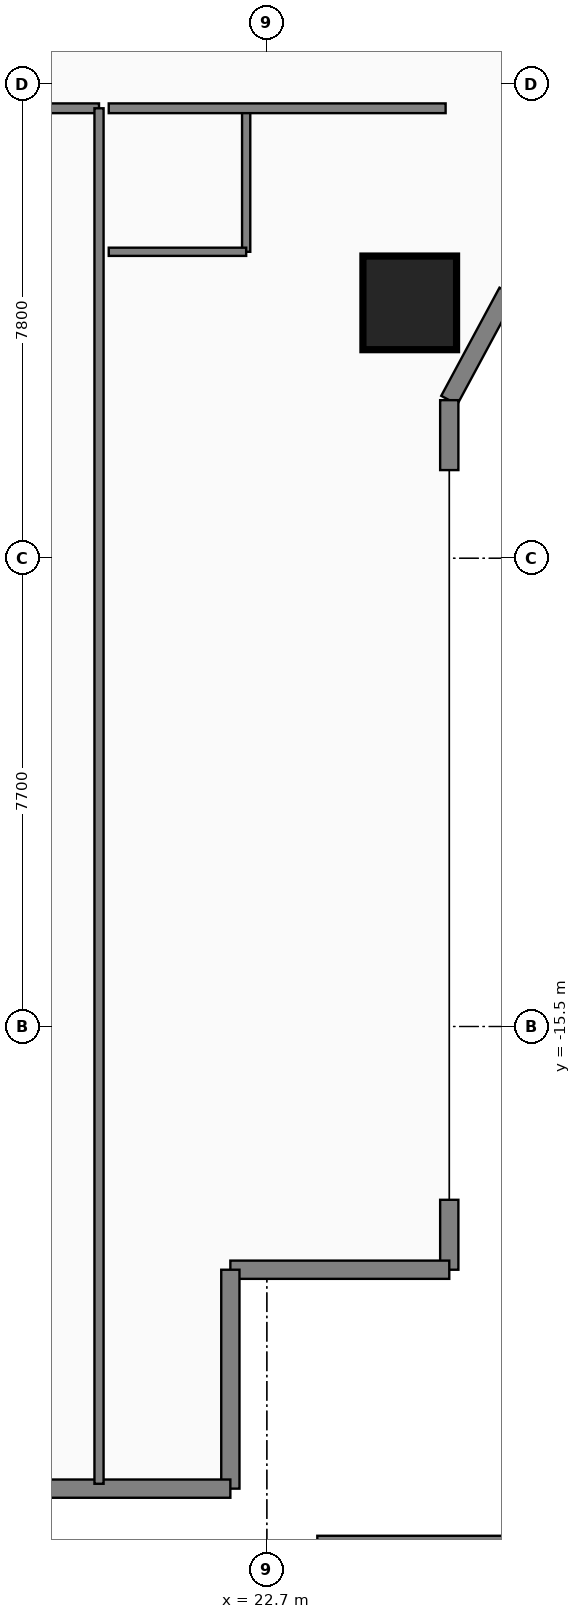
"""IFC4 building model, lengths in metres.
Left out: names, types, materials, properties, quantities, classifications, styles, units other than length and angle.
Written with IfcOpenShell. Run it as: python <this file> out.ifc"""

import sys

from ifc_helpers import new_model, si_unit, direction, frame, frame_2d, origin, origin_2d, place, context, subcontext, project, spatial, rectangle, extrude, element, fill, save


model = new_model("IFC4")
c1 = context("Model", 3, precision=1e-05, world=origin(), true_north=direction((0.0, 1.0)))
c2 = subcontext(c1, "Body", "Model", "MODEL_VIEW")
j1 = project(units=[si_unit("LENGTHUNIT", "METRE"), si_unit("PLANEANGLEUNIT", "RADIAN")], contexts=[c1])
p1 = place(None, origin())
s1 = spatial("IfcSite", under=j1, at=p1, CompositionType="ELEMENT")
p2 = place(p1, origin())
s2 = spatial("IfcBuilding", under=s1, at=p2, CompositionType="ELEMENT")
p3 = place(p2, frame((0.0, 0.0, 27.6)))
s3 = spatial("IfcBuildingStorey", under=s2, at=p3, CompositionType="ELEMENT", Elevation=27.6)
p4 = place(p3, frame((25.05, -3.6, 0.0), z_axis=(0.0, 0.0, 1.0), x_axis=(1.0, 0.0, 0.0)))
e1 = element("IfcColumn", 1, at=p4, inside=s3, PredefinedType="COLUMN", context=c2, shape_type="SweptSolid", body=[
    extrude(rectangle(XDim=1.5, YDim=1.5, at=origin_2d()), origin(), (0.0, 0.0, 1.0), 3.65),
])
p5 = place(p3, frame((31.82, -24.0, 0.0), z_axis=(0.0, 0.0, 1.0), x_axis=(-1.0, 0.0, 0.0)))
e2 = element("IfcWall", 2, at=p5, inside=s3, PredefinedType="PARAPET", context=c2, shape_type="SweptSolid", body=[
    extrude(rectangle(XDim=8.29, YDim=0.25, at=frame_2d((4.145, 0.0))), origin(), (0.0, 0.0, 1.0), 1.15),
])
p6 = place(p3, frame((25.7, 5.2, 0.0), z_axis=(0.0, 0.0, 1.0), x_axis=(0.474109683532, -0.880465790352, 0.0)))
e3 = element("IfcWall", 3, at=p6, inside=s3, PredefinedType="STANDARD", context=c2, shape_type="SweptSolid", body=[
    extrude(rectangle(XDim=5.906, YDim=0.3, at=frame_2d((2.953, 0.0))), origin(), (0.0, 0.0, 1.0), 3.43),
])
p7 = place(p6, frame((2.324, 0.0, 0.95)))
e4 = element("IfcOpeningElement", 4, at=p7, cuts=e3, PredefinedType="OPENING", context=c2, shape_type="SweptSolid", body=[
    extrude(rectangle(XDim=1.15, YDim=1.55, at=frame_2d((0.575, 0.775))), frame((0.0, 0.16, 0.0), z_axis=(0.0, -1.0, 0.0), x_axis=(1.0, 0.0, 0.0)), (0.0, 0.0, 1.0), 0.32),
])
p8 = place(p3, frame((26.658, -3.421, 0.0), z_axis=(0.0, 0.0, 1.0), x_axis=(-0.474121438562, -0.88045946045, 0.0)))
e5 = element("IfcWall", 5, at=p8, inside=s3, PredefinedType="STANDARD", context=c2, shape_type="SweptSolid", body=[
    extrude(rectangle(XDim=2.021, YDim=0.3, at=frame_2d((1.01, 0.0))), origin(), (0.0, 0.0, 1.0), 3.43),
])
p9 = place(p3, frame((25.7, -5.2, 0.0), z_axis=(0.0, 0.0, 1.0), x_axis=(0.0, -1.0, 0.0)))
e6 = element("IfcWall", 6, at=p9, inside=s3, PredefinedType="STANDARD", context=c2, shape_type="SweptSolid", body=[
    extrude(rectangle(XDim=1.15, YDim=0.3, at=frame_2d((0.575, 0.0))), origin(), (0.0, 0.0, 1.0), 3.43),
])
p10 = place(p3, frame((25.7, -18.35, 0.0), z_axis=(0.0, 0.0, 1.0), x_axis=(0.0, -1.0, 0.0)))
e7 = element("IfcWall", 7, at=p10, inside=s3, PredefinedType="STANDARD", context=c2, shape_type="SweptSolid", body=[
    extrude(rectangle(XDim=1.15, YDim=0.3, at=frame_2d((0.575, 0.0))), origin(), (0.0, 0.0, 1.0), 3.43),
])
p11 = place(p3, frame((25.7, -19.5, 0.0), z_axis=(0.0, 0.0, 1.0), x_axis=(-1.0, 0.0, 0.0)))
e8 = element("IfcWall", 8, at=p11, inside=s3, PredefinedType="STANDARD", context=c2, shape_type="SweptSolid", body=[
    extrude(rectangle(XDim=3.6, YDim=0.3, at=frame_2d((1.8, 0.0))), origin(), (0.0, 0.0, 1.0), 3.43),
])
p12 = place(p3, frame((22.1, -19.5, 0.0), z_axis=(0.0, 0.0, 1.0), x_axis=(0.0, -1.0, 0.0)))
e9 = element("IfcWall", 9, at=p12, inside=s3, PredefinedType="STANDARD", context=c2, shape_type="SweptSolid", body=[
    extrude(rectangle(XDim=3.6, YDim=0.3, at=frame_2d((1.8, 0.0))), origin(), (0.0, 0.0, 1.0), 3.43),
])
p13 = place(p3, frame((22.1, -23.1, 0.0), z_axis=(0.0, 0.0, 1.0), x_axis=(-1.0, 0.0, 0.0)))
e10 = element("IfcWall", 10, at=p13, inside=s3, PredefinedType="STANDARD", context=c2, shape_type="SweptSolid", body=[
    extrude(rectangle(XDim=4.0, YDim=0.3, at=frame_2d((2.0, 0.0))), origin(), (0.0, 0.0, 1.0), 3.43),
])
p14 = place(p13, frame((0.565, 0.0, 0.95)))
e11 = element("IfcOpeningElement", 11, at=p14, cuts=e10, PredefinedType="OPENING", context=c2, shape_type="SweptSolid", body=[
    extrude(rectangle(XDim=1.15, YDim=1.55, at=frame_2d((0.575, 0.775))), frame((0.0, 0.16, 0.0), z_axis=(0.0, -1.0, 0.0), x_axis=(1.0, 0.0, 0.0)), (0.0, 0.0, 1.0), 0.32),
])
p15 = place(p3, frame((14.4, -0.4, 0.0), z_axis=(0.0, 0.0, 1.0), x_axis=(1.0, 0.0, 0.0)))
e12 = element("IfcWall", 12, at=p15, inside=s3, PredefinedType="PARTITIONING", context=c2, shape_type="SweptSolid", body=[
    extrude(rectangle(XDim=5.54, YDim=0.16, at=frame_2d((2.77, 0.0))), origin(), (0.0, 0.0, 1.0), 3.43),
])
p16 = place(p15, frame((3.42, 0.0, 0.0)))
e13 = element("IfcOpeningElement", 13, at=p16, cuts=e12, PredefinedType="OPENING", context=c2, shape_type="SweptSolid", body=[
    extrude(rectangle(XDim=1.0, YDim=2.15, at=frame_2d((0.5, 1.075))), frame((0.0, 0.09, 0.0), z_axis=(0.0, -1.0, 0.0), x_axis=(1.0, 0.0, 0.0)), (0.0, 0.0, 1.0), 0.18),
])
p17 = place(p3, frame((22.36, -2.76, 0.0), z_axis=(0.0, 0.0, 1.0), x_axis=(0.0, 1.0, 0.0)))
e14 = element("IfcWall", 14, at=p17, inside=s3, PredefinedType="PLUMBINGWALL", context=c2, shape_type="SweptSolid", body=[
    extrude(rectangle(XDim=2.36, YDim=0.135, at=frame_2d((1.18, 0.0))), origin(), (0.0, 0.0, 1.0), 3.43),
])
p18 = place(p17, frame((0.65, 0.0, 0.0)))
e15 = element("IfcOpeningElement", 15, at=p18, cuts=e14, PredefinedType="OPENING", context=c2, shape_type="SweptSolid", body=[
    extrude(rectangle(XDim=0.85, YDim=2.1, at=frame_2d((0.425, 1.05))), frame((0.0, 0.077, 0.0), z_axis=(0.0, -1.0, 0.0), x_axis=(1.0, 0.0, 0.0)), (0.0, 0.0, 1.0), 0.155),
])
p19 = place(p3, frame((20.1, -0.4, 0.0), z_axis=(0.0, 0.0, 1.0), x_axis=(1.0, 0.0, 0.0)))
e16 = element("IfcWall", 16, at=p19, inside=s3, PredefinedType="PARTITIONING", context=c2, shape_type="SweptSolid", body=[
    extrude(rectangle(XDim=5.54, YDim=0.16, at=frame_2d((2.77, 0.0))), origin(), (0.0, 0.0, 1.0), 3.43),
])
p20 = place(p19, frame((3.42, 0.0, 0.0)))
e17 = element("IfcOpeningElement", 17, at=p20, cuts=e16, PredefinedType="OPENING", context=c2, shape_type="SweptSolid", body=[
    extrude(rectangle(XDim=1.0, YDim=2.15, at=frame_2d((0.5, 1.075))), frame((0.0, 0.09, 0.0), z_axis=(0.0, -1.0, 0.0), x_axis=(1.0, 0.0, 0.0)), (0.0, 0.0, 1.0), 0.18),
])
p21 = place(p3, frame((19.94, -23.02, 0.0), z_axis=(0.0, 0.0, 1.0), x_axis=(0.0, 1.0, 0.0)))
e18 = element("IfcWall", 18, at=p21, inside=s3, PredefinedType="PARTITIONING", context=c2, shape_type="SweptSolid", body=[
    extrude(rectangle(XDim=22.62, YDim=0.15, at=frame_2d((11.31, 0.0))), origin(), (0.0, 0.0, 1.0), 3.43),
])
p22 = place(p3, frame((20.1, -2.76, 0.0), z_axis=(0.0, 0.0, 1.0), x_axis=(1.0, 0.0, 0.0)))
e19 = element("IfcWall", 19, at=p22, inside=s3, PredefinedType="PLUMBINGWALL", context=c2, shape_type="SweptSolid", body=[
    extrude(rectangle(XDim=2.26, YDim=0.135, at=frame_2d((1.13, 0.0))), origin(), (0.0, 0.0, 1.0), 3.43),
])
p23 = place(p14, origin())
e20 = element("IfcWindow", 20, at=p23, inside=s3, PartitioningType="SINGLE_PANEL", PredefinedType="WINDOW", context=c2, shape_type="SweptSolid", body=[
    extrude(rectangle(XDim=1.15, YDim=1.55, at=frame_2d((0.575, 0.775))), frame((0.0, 0.03, 0.0), z_axis=(0.0, -1.0, 0.0), x_axis=(1.0, 0.0, 0.0)), (0.0, 0.0, 1.0), 0.06),
])
fill(e11, e20)
p24 = place(p18, origin())
e21 = element("IfcDoor", 21, at=p24, inside=s3, OperationType="SINGLE_SWING_LEFT", PredefinedType="DOOR", context=c2, shape_type="SweptSolid", body=[
    extrude(rectangle(XDim=0.85, YDim=2.1, at=frame_2d((0.425, 1.05))), frame((0.0, 0.025, 0.0), z_axis=(0.0, -1.0, 0.0), x_axis=(1.0, 0.0, 0.0)), (0.0, 0.0, 1.0), 0.05),
])
fill(e15, e21)
p25 = place(p20, origin())
e22 = element("IfcDoor", 22, at=p25, inside=s3, OperationType="SINGLE_SWING_RIGHT", PredefinedType="DOOR", context=c2, shape_type="SweptSolid", body=[
    extrude(rectangle(XDim=1.0, YDim=2.15, at=frame_2d((0.5, 1.075))), frame((0.0, 0.025, 0.0), z_axis=(0.0, -1.0, 0.0), x_axis=(1.0, 0.0, 0.0)), (0.0, 0.0, 1.0), 0.05),
])
fill(e17, e22)
save(model, sys.argv[1])
